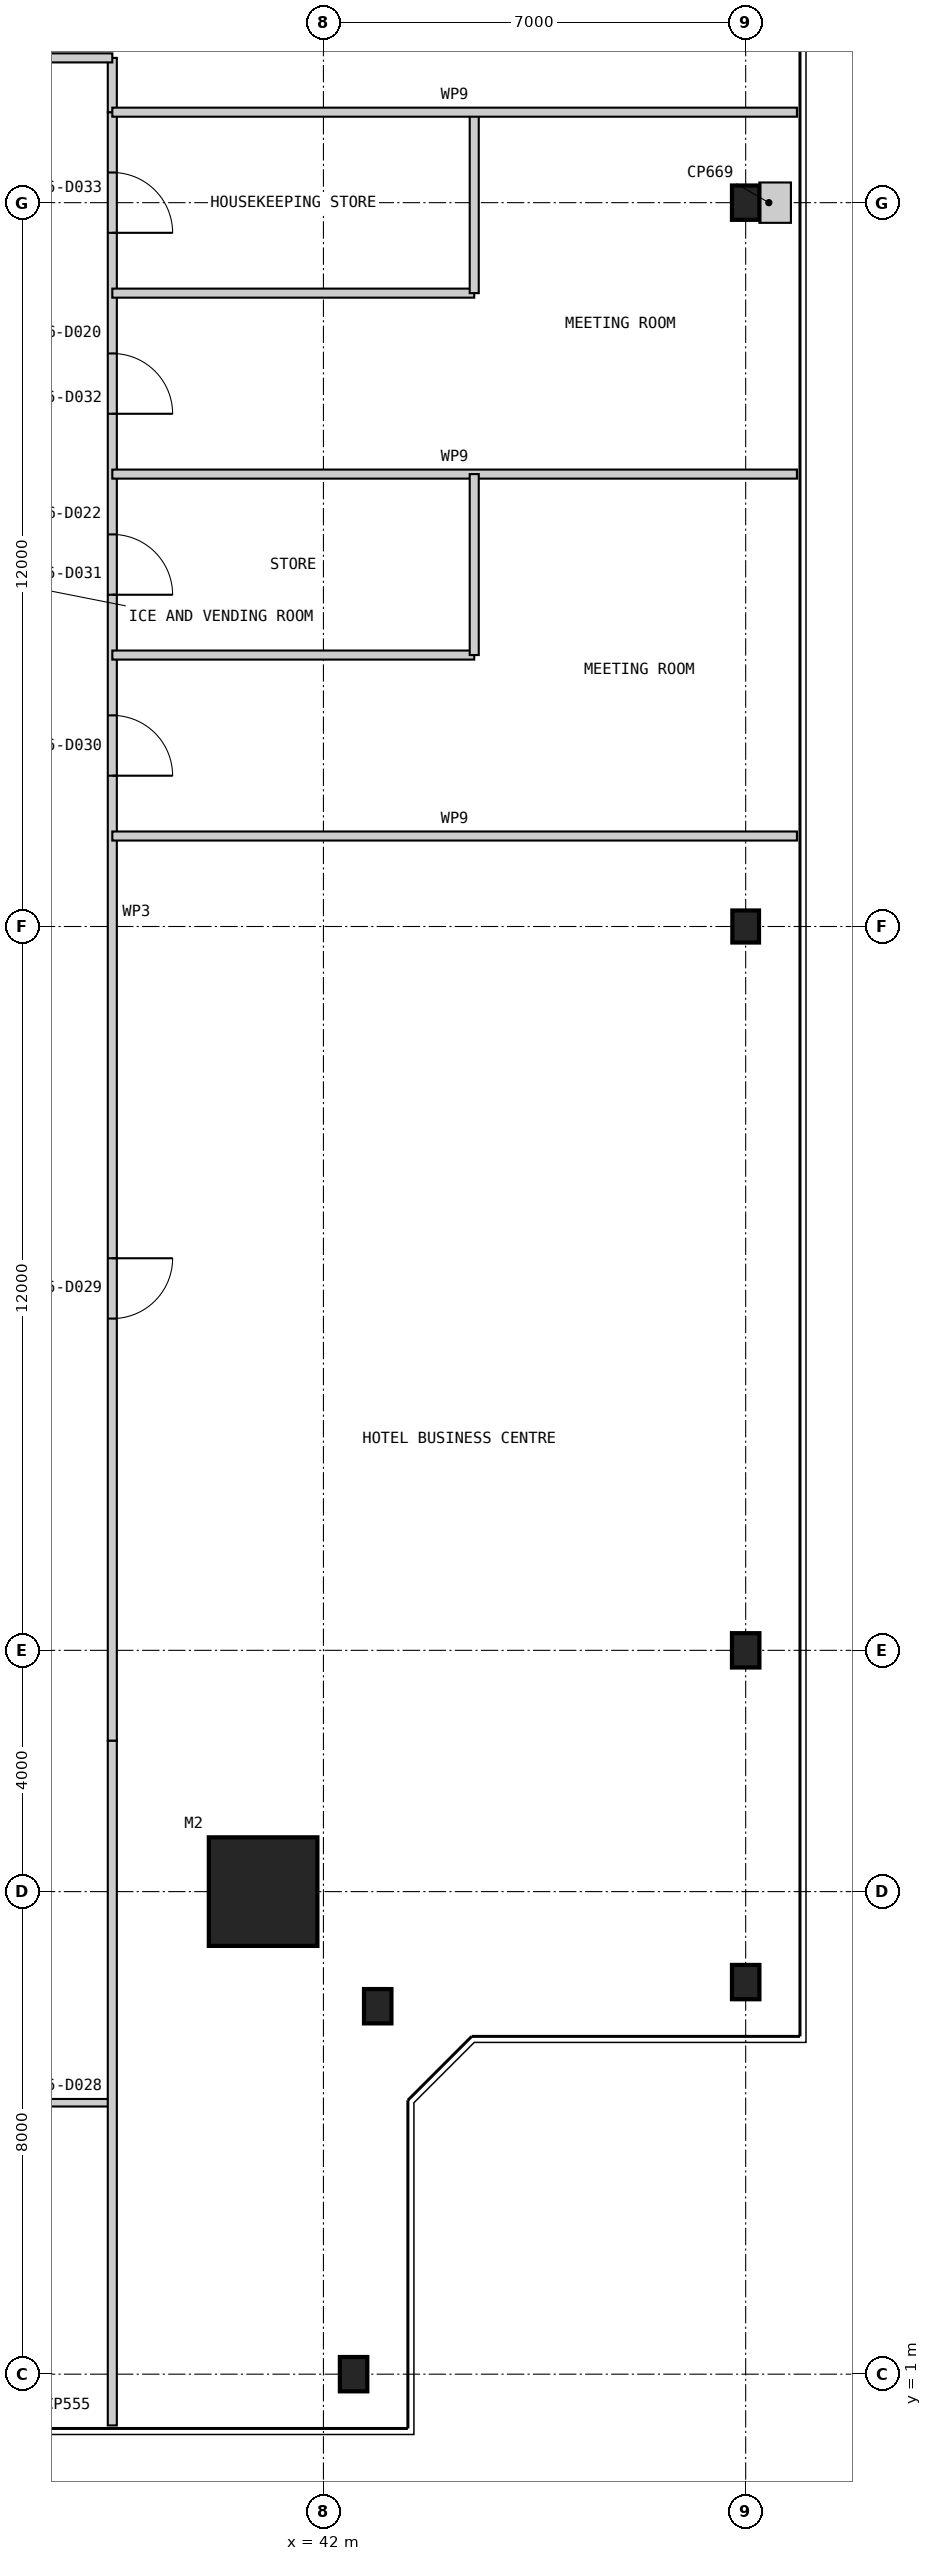
"""IFC4 building model, lengths in metres.
Left out: names, types, materials, properties, quantities, classifications, styles, units other than length and angle.
Written with IfcOpenShell. Run it as: python <this file> out.ifc"""

import sys

from ifc_helpers import new_model, si_unit, direction, frame, frame_2d, origin, origin_2d, place, context, subcontext, project, spatial, rectangle, i_section, extrude, element, fill, save


model = new_model("IFC4")
c1 = context("Model", 3, precision=1e-05, world=origin(), true_north=direction((0.0, 1.0)))
c2 = subcontext(c1, "Body", "Model", "MODEL_VIEW")
j1 = project(units=[si_unit("LENGTHUNIT", "METRE"), si_unit("PLANEANGLEUNIT", "RADIAN")], contexts=[c1])
p1 = place(None, origin())
s1 = spatial("IfcSite", under=j1, at=p1, CompositionType="ELEMENT")
p2 = place(p1, origin())
s2 = spatial("IfcBuilding", under=s1, at=p2, CompositionType="ELEMENT")
p3 = place(p2, frame((0.0, 0.0, 239.8)))
s3 = spatial("IfcBuildingStorey", under=s2, at=p3, CompositionType="ELEMENT", Elevation=239.8)
p4 = place(p3, frame((41.0, 9.0, 0.0), z_axis=(0.0, 0.0, 1.0), x_axis=(1.0, 0.0, 0.0)))
e1 = element("IfcColumn", 1, at=p4, inside=s3, PredefinedType="COLUMN", context=c2, shape_type="SweptSolid", body=[
    extrude(rectangle(XDim=1.8, YDim=1.8, at=origin_2d()), origin(), (0.0, 0.0, 1.0), 6.0),
])
for number, where, z_axis, x_axis in (
    (2, (42.5, 1.0, 0.0), (0.0, 0.0, 1.0), (1.0, 0.0, 0.0)),
    (3, (42.9, 7.1, 0.0), (0.0, 0.0, 1.0), (1.0, 0.0, 0.0)),
    (4, (49.0, 7.5, 0.0), (0.0, 0.0, 1.0), (1.0, 0.0, 0.0)),
    (5, (49.0, 13.0, 0.0), (0.0, 0.0, 1.0), (1.0, 0.0, 0.0)),
):
    element("IfcColumn", number, at=place(p3, frame(where, z_axis=z_axis, x_axis=x_axis)), inside=s3, PredefinedType="COLUMN", context=c2, shape_type="SweptSolid", body=[
        extrude(i_section(OverallWidth=0.455, OverallDepth=0.569, WebThickness=0.078, FlangeThickness=0.125, at=origin_2d()), origin(), (0.0, 0.0, 1.0), 6.0),
    ])
p5 = place(p3, frame((49.0, 25.0, 0.0), z_axis=(0.0, 0.0, 1.0), x_axis=(1.0, 0.0, 0.0)))
e6 = element("IfcColumn", 6, at=p5, inside=s3, PredefinedType="COLUMN", context=c2, shape_type="SweptSolid", body=[
    extrude(i_section(OverallWidth=0.442, OverallDepth=0.531, WebThickness=0.066, FlangeThickness=0.106, at=origin_2d()), origin(), (0.0, 0.0, 1.0), 6.0),
])
p6 = place(p3, frame((49.0, 37.0, 0.0), z_axis=(0.0, 0.0, 1.0), x_axis=(1.0, 0.0, 0.0)))
e7 = element("IfcColumn", 7, at=p6, inside=s3, PredefinedType="COLUMN", context=c2, shape_type="SweptSolid", body=[
    extrude(i_section(OverallWidth=0.455, OverallDepth=0.569, WebThickness=0.078, FlangeThickness=0.125, at=origin_2d()), origin(), (0.0, 0.0, 1.0), 6.0),
])
p7 = place(p3, frame((14.5, 5.5, 0.0), z_axis=(0.0, 0.0, 1.0), x_axis=(1.0, 0.0, 0.0)))
e8 = element("IfcWall", 8, at=p7, inside=s3, PredefinedType="PARTITIONING", context=c2, shape_type="SweptSolid", body=[
    extrude(rectangle(XDim=24.0, YDim=0.125, at=frame_2d((12.0, 0.0))), origin(), (0.0, 0.0, 1.0), 5.85),
])
p8 = place(p7, frame((10.05, 0.0, 0.0)))
e9 = element("IfcOpeningElement", 9, at=p8, cuts=e8, PredefinedType="OPENING", context=c2, shape_type="SweptSolid", body=[
    extrude(rectangle(XDim=0.9, YDim=2.2, at=frame_2d((0.45, 1.1))), frame((0.0, 0.073, 0.0), z_axis=(0.0, -1.0, 0.0), x_axis=(1.0, 0.0, 0.0)), (0.0, 0.0, 1.0), 0.145),
])
p9 = place(p7, frame((16.05, 0.0, 0.0)))
e10 = element("IfcOpeningElement", 10, at=p9, cuts=e8, PredefinedType="OPENING", context=c2, shape_type="SweptSolid", body=[
    extrude(rectangle(XDim=0.9, YDim=2.2, at=frame_2d((0.45, 1.1))), frame((0.0, 0.073, 0.0), z_axis=(0.0, -1.0, 0.0), x_axis=(1.0, 0.0, 0.0)), (0.0, 0.0, 1.0), 0.145),
])
p10 = place(p7, frame((22.05, 0.0, 0.0)))
e11 = element("IfcOpeningElement", 11, at=p10, cuts=e8, PredefinedType="OPENING", context=c2, shape_type="SweptSolid", body=[
    extrude(rectangle(XDim=0.9, YDim=2.2, at=frame_2d((0.45, 1.1))), frame((0.0, 0.073, 0.0), z_axis=(0.0, -1.0, 0.0), x_axis=(1.0, 0.0, 0.0)), (0.0, 0.0, 1.0), 0.145),
])
p11 = place(p3, frame((38.5, 11.5, 0.0), z_axis=(0.0, 0.0, 1.0), x_axis=(0.0, 1.0, 0.0)))
e12 = element("IfcWall", 12, at=p11, inside=s3, PredefinedType="PARTITIONING", context=c2, shape_type="SweptSolid", body=[
    extrude(rectangle(XDim=27.0, YDim=0.15, at=frame_2d((13.5, 0.0))), origin(), (0.0, 0.0, 1.0), 5.85),
])
p12 = place(p11, frame((7.0, 0.0, 0.0)))
e13 = element("IfcOpeningElement", 13, at=p12, cuts=e12, PredefinedType="OPENING", context=c2, shape_type="SweptSolid", body=[
    extrude(rectangle(XDim=1.0, YDim=2.2, at=frame_2d((0.5, 1.1))), frame((0.0, 0.085, 0.0), z_axis=(0.0, -1.0, 0.0), x_axis=(1.0, 0.0, 0.0)), (0.0, 0.0, 1.0), 0.17),
])
p13 = place(p11, frame((16.0, 0.0, 0.0)))
e14 = element("IfcOpeningElement", 14, at=p13, cuts=e12, PredefinedType="OPENING", context=c2, shape_type="SweptSolid", body=[
    extrude(rectangle(XDim=1.0, YDim=2.2, at=frame_2d((0.5, 1.1))), frame((0.0, 0.085, 0.0), z_axis=(0.0, -1.0, 0.0), x_axis=(1.0, 0.0, 0.0)), (0.0, 0.0, 1.0), 0.17),
])
p14 = place(p11, frame((19.0, 0.0, 0.0)))
e15 = element("IfcOpeningElement", 15, at=p14, cuts=e12, PredefinedType="OPENING", context=c2, shape_type="SweptSolid", body=[
    extrude(rectangle(XDim=1.0, YDim=2.2, at=frame_2d((0.5, 1.1))), frame((0.0, 0.085, 0.0), z_axis=(0.0, -1.0, 0.0), x_axis=(1.0, 0.0, 0.0)), (0.0, 0.0, 1.0), 0.17),
])
p15 = place(p11, frame((22.0, 0.0, 0.0)))
e16 = element("IfcOpeningElement", 16, at=p15, cuts=e12, PredefinedType="OPENING", context=c2, shape_type="SweptSolid", body=[
    extrude(rectangle(XDim=1.0, YDim=2.2, at=frame_2d((0.5, 1.1))), frame((0.0, 0.085, 0.0), z_axis=(0.0, -1.0, 0.0), x_axis=(1.0, 0.0, 0.0)), (0.0, 0.0, 1.0), 0.17),
])
p16 = place(p11, frame((25.0, 0.0, 0.0)))
e17 = element("IfcOpeningElement", 17, at=p16, cuts=e12, PredefinedType="OPENING", context=c2, shape_type="SweptSolid", body=[
    extrude(rectangle(XDim=1.0, YDim=2.2, at=frame_2d((0.5, 1.1))), frame((0.0, 0.085, 0.0), z_axis=(0.0, -1.0, 0.0), x_axis=(1.0, 0.0, 0.0)), (0.0, 0.0, 1.0), 0.17),
])
for number, where, z_axis, x_axis in (
    (18, (38.5, 0.15, 0.0), (0.0, 0.0, 1.0), (0.0, 1.0, 0.0)),
    (19, (49.85, 26.5, 0.0), (0.0, 0.0, 1.0), (-1.0, 0.0, 0.0)),
):
    element("IfcWall", number, at=place(p3, frame(where, z_axis=z_axis, x_axis=x_axis)), inside=s3, PredefinedType="PARTITIONING", context=c2, shape_type="SweptSolid", body=[
        extrude(rectangle(XDim=11.35, YDim=0.15, at=frame_2d((5.675, 0.0))), origin(), (0.0, 0.0, 1.0), 5.85),
    ])
p17 = place(p3, frame((44.5, 29.5, 0.0), z_axis=(0.0, 0.0, 1.0), x_axis=(-1.0, 0.0, 0.0)))
e20 = element("IfcWall", 20, at=p17, inside=s3, PredefinedType="PARTITIONING", context=c2, shape_type="SweptSolid", body=[
    extrude(rectangle(XDim=6.0, YDim=0.15, at=frame_2d((3.0, 0.0))), origin(), (0.0, 0.0, 1.0), 5.85),
])
p18 = place(p3, frame((49.85, 32.5, 0.0), z_axis=(0.0, 0.0, 1.0), x_axis=(-1.0, 0.0, 0.0)))
e21 = element("IfcWall", 21, at=p18, inside=s3, PredefinedType="PARTITIONING", context=c2, shape_type="SweptSolid", body=[
    extrude(rectangle(XDim=11.35, YDim=0.15, at=frame_2d((5.675, 0.0))), origin(), (0.0, 0.0, 1.0), 5.85),
])
p19 = place(p3, frame((44.5, 35.5, 0.0), z_axis=(0.0, 0.0, 1.0), x_axis=(-1.0, 0.0, 0.0)))
e22 = element("IfcWall", 22, at=p19, inside=s3, PredefinedType="PARTITIONING", context=c2, shape_type="SweptSolid", body=[
    extrude(rectangle(XDim=6.0, YDim=0.15, at=frame_2d((3.0, 0.0))), origin(), (0.0, 0.0, 1.0), 5.85),
])
for number, where, z_axis, x_axis in (
    (23, (44.5, 29.5, 0.0), (0.0, 0.0, 1.0), (0.0, 1.0, 0.0)),
    (24, (44.5, 35.5, 0.0), (0.0, 0.0, 1.0), (0.0, 1.0, 0.0)),
):
    element("IfcWall", number, at=place(p3, frame(where, z_axis=z_axis, x_axis=x_axis)), inside=s3, PredefinedType="PARTITIONING", context=c2, shape_type="SweptSolid", body=[
        extrude(rectangle(XDim=3.0, YDim=0.15, at=frame_2d((1.5, 0.0))), origin(), (0.0, 0.0, 1.0), 5.85),
    ])
p20 = place(p3, frame((38.5, 38.5, 0.0), z_axis=(0.0, 0.0, 1.0), x_axis=(0.0, 1.0, 0.0)))
e25 = element("IfcWall", 25, at=p20, inside=s3, PredefinedType="PARTITIONING", context=c2, shape_type="SweptSolid", body=[
    extrude(rectangle(XDim=0.9, YDim=0.15, at=frame_2d((0.45, 0.0))), origin(), (0.0, 0.0, 1.0), 5.85),
])
p21 = place(p3, frame((38.5, 39.4, 0.0), z_axis=(0.0, 0.0, 1.0), x_axis=(-1.0, 0.0, 0.0)))
e26 = element("IfcWall", 26, at=p21, inside=s3, PredefinedType="PARTITIONING", context=c2, shape_type="SweptSolid", body=[
    extrude(rectangle(XDim=27.0, YDim=0.15, at=frame_2d((13.5, 0.0))), origin(), (0.0, 0.0, 1.0), 5.85),
])
p22 = place(p21, frame((13.0, 0.0, 0.0)))
e27 = element("IfcOpeningElement", 27, at=p22, cuts=e26, PredefinedType="OPENING", context=c2, shape_type="SweptSolid", body=[
    extrude(rectangle(XDim=1.0, YDim=2.2, at=frame_2d((0.5, 1.1))), frame((0.0, 0.085, 0.0), z_axis=(0.0, -1.0, 0.0), x_axis=(1.0, 0.0, 0.0)), (0.0, 0.0, 1.0), 0.17),
])
p23 = place(p3, frame((49.85, 38.5, 0.0), z_axis=(0.0, 0.0, 1.0), x_axis=(-1.0, 0.0, 0.0)))
e28 = element("IfcWall", 28, at=p23, inside=s3, PredefinedType="PARTITIONING", context=c2, shape_type="SweptSolid", body=[
    extrude(rectangle(XDim=11.35, YDim=0.15, at=frame_2d((5.675, 0.0))), origin(), (0.0, 0.0, 1.0), 5.85),
])
p24 = place(p3, frame((49.75, 37.0, 0.0), z_axis=(0.0, 0.0, 1.0), x_axis=(-1.0, 0.0, 0.0)))
e29 = element("IfcWall", 29, at=p24, inside=s3, PredefinedType="PARTITIONING", context=c2, shape_type="SweptSolid", body=[
    extrude(rectangle(XDim=0.523, YDim=0.669, at=frame_2d((0.261, 0.0))), origin(), (0.0, 0.0, 1.0), 5.85),
])
p25 = place(p12, frame((1.0, 0.0, 0.0), z_axis=(0.0, 0.0, 1.0), x_axis=(-1.0, 0.0, 0.0)))
e30 = element("IfcDoor", 30, at=p25, inside=s3, OperationType="SINGLE_SWING_LEFT", PredefinedType="DOOR", context=c2, shape_type="SweptSolid", body=[
    extrude(rectangle(XDim=1.0, YDim=2.2, at=frame_2d((0.5, 1.1))), frame((0.0, 0.025, 0.0), z_axis=(0.0, -1.0, 0.0), x_axis=(1.0, 0.0, 0.0)), (0.0, 0.0, 1.0), 0.05),
])
fill(e13, e30)
p26 = place(p13, frame((1.0, 0.0, 0.0), z_axis=(0.0, 0.0, 1.0), x_axis=(-1.0, 0.0, 0.0)))
e31 = element("IfcDoor", 31, at=p26, inside=s3, OperationType="SINGLE_SWING_RIGHT", PredefinedType="DOOR", context=c2, shape_type="SweptSolid", body=[
    extrude(rectangle(XDim=1.0, YDim=2.2, at=frame_2d((0.5, 1.1))), frame((0.0, 0.025, 0.0), z_axis=(0.0, -1.0, 0.0), x_axis=(1.0, 0.0, 0.0)), (0.0, 0.0, 1.0), 0.05),
])
fill(e14, e31)
p27 = place(p14, frame((1.0, 0.0, 0.0), z_axis=(0.0, 0.0, 1.0), x_axis=(-1.0, 0.0, 0.0)))
e32 = element("IfcDoor", 32, at=p27, inside=s3, OperationType="SINGLE_SWING_RIGHT", PredefinedType="DOOR", context=c2, shape_type="SweptSolid", body=[
    extrude(rectangle(XDim=1.0, YDim=2.2, at=frame_2d((0.5, 1.1))), frame((0.0, 0.025, 0.0), z_axis=(0.0, -1.0, 0.0), x_axis=(1.0, 0.0, 0.0)), (0.0, 0.0, 1.0), 0.05),
])
fill(e15, e32)
p28 = place(p15, frame((1.0, 0.0, 0.0), z_axis=(0.0, 0.0, 1.0), x_axis=(-1.0, 0.0, 0.0)))
e33 = element("IfcDoor", 33, at=p28, inside=s3, OperationType="SINGLE_SWING_RIGHT", PredefinedType="DOOR", context=c2, shape_type="SweptSolid", body=[
    extrude(rectangle(XDim=1.0, YDim=2.2, at=frame_2d((0.5, 1.1))), frame((0.0, 0.025, 0.0), z_axis=(0.0, -1.0, 0.0), x_axis=(1.0, 0.0, 0.0)), (0.0, 0.0, 1.0), 0.05),
])
fill(e16, e33)
p29 = place(p16, frame((1.0, 0.0, 0.0), z_axis=(0.0, 0.0, 1.0), x_axis=(-1.0, 0.0, 0.0)))
e34 = element("IfcDoor", 34, at=p29, inside=s3, OperationType="SINGLE_SWING_RIGHT", PredefinedType="DOOR", context=c2, shape_type="SweptSolid", body=[
    extrude(rectangle(XDim=1.0, YDim=2.2, at=frame_2d((0.5, 1.1))), frame((0.0, 0.025, 0.0), z_axis=(0.0, -1.0, 0.0), x_axis=(1.0, 0.0, 0.0)), (0.0, 0.0, 1.0), 0.05),
])
fill(e17, e34)
save(model, sys.argv[1])
